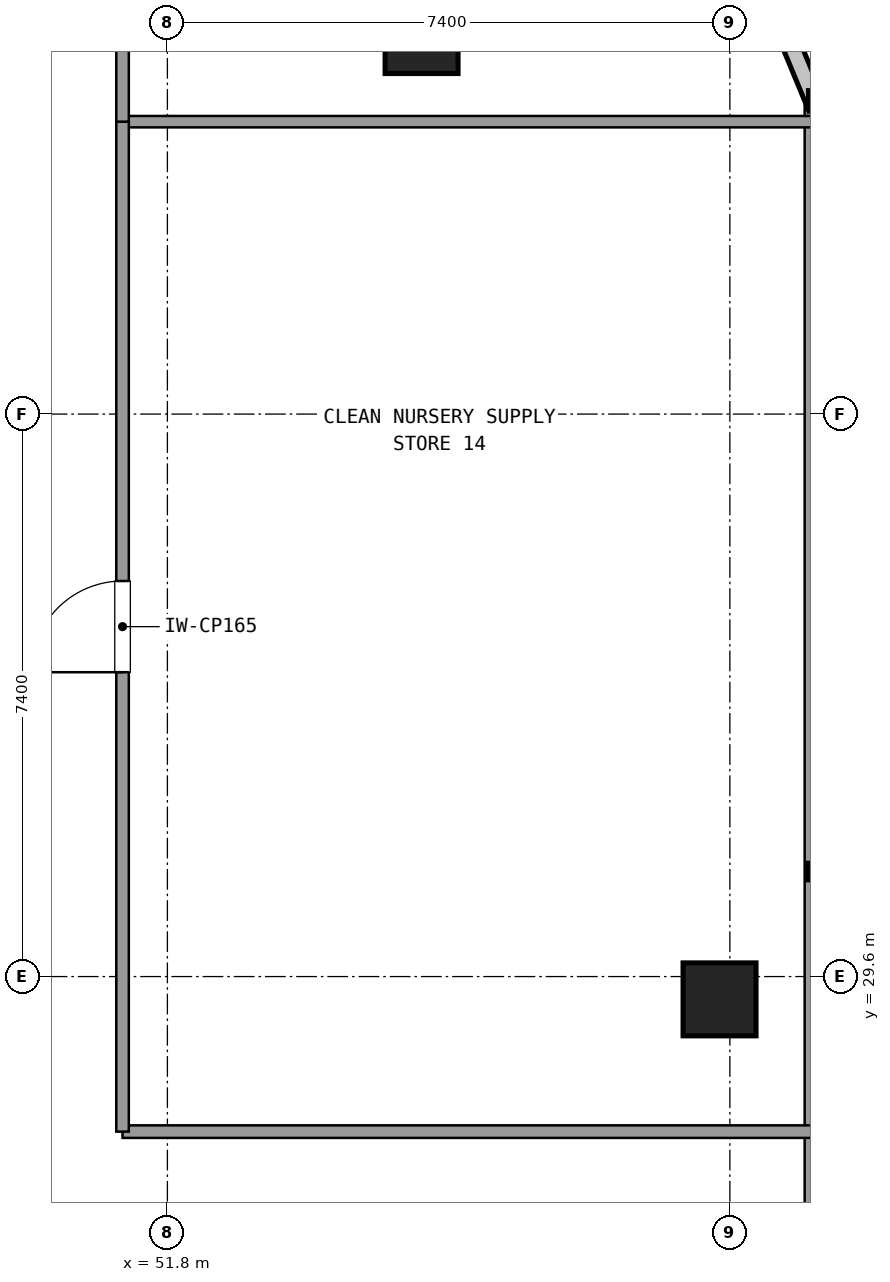
"""IFC4 building model, lengths in metres.
Left out: names, types, materials, properties, quantities, classifications, styles, units other than length and angle.
Written with IfcOpenShell. Run it as: python <this file> out.ifc"""

import sys

from ifc_helpers import new_model, si_unit, direction, frame, frame_2d, origin, origin_2d, place, context, subcontext, project, spatial, rectangle, extrude, element, fill, save


model = new_model("IFC4")
c1 = context("Model", 3, precision=1e-05, world=origin(), true_north=direction((0.0, 1.0)))
c2 = subcontext(c1, "Body", "Model", "MODEL_VIEW")
j1 = project(units=[si_unit("LENGTHUNIT", "METRE"), si_unit("PLANEANGLEUNIT", "RADIAN")], contexts=[c1])
p1 = place(None, origin())
s1 = spatial("IfcSite", under=j1, at=p1, CompositionType="ELEMENT")
p2 = place(p1, origin())
s2 = spatial("IfcBuilding", under=s1, at=p2, CompositionType="ELEMENT")
p3 = place(p2, frame((0.0, 0.0, 163.62)))
s3 = spatial("IfcBuildingStorey", under=s2, at=p3, CompositionType="ELEMENT", Elevation=163.62)
for number, where, z_axis, x_axis in (
    (1, (59.064, 29.3, 0.0), (0.0, 0.0, 1.0), (1.0, 0.0, 0.0)),
    (2, (55.144, 41.96, 0.0), (0.0, 0.0, 1.0), (1.0, 0.0, 0.0)),
):
    element("IfcColumn", number, at=place(p3, frame(where, z_axis=z_axis, x_axis=x_axis)), inside=s3, PredefinedType="COLUMN", context=c2, shape_type="SweptSolid", body=[
        extrude(rectangle(XDim=0.96, YDim=0.96, at=origin_2d()), origin(), (0.0, 0.0, 1.0), 3.6),
    ])
p4 = place(p3, frame((60.304, 10.655, 0.0), z_axis=(0.0, 0.0, 1.0), x_axis=(0.0, 1.0, 0.0)))
e3 = element("IfcWall", 3, at=p4, inside=s3, PredefinedType="SOLIDWALL", context=c2, shape_type="SweptSolid", body=[
    extrude(rectangle(XDim=30.49, YDim=0.24, at=frame_2d((15.245, 0.0))), origin(), (0.0, 0.0, 1.0), 0.85),
])
p5 = place(p3, frame((51.21, 27.56, 0.0), z_axis=(0.0, 0.0, 1.0), x_axis=(1.0, 0.0, 0.0)))
e4 = element("IfcWall", 4, at=p5, inside=s3, PredefinedType="PARTITIONING", context=c2, shape_type="SweptSolid", body=[
    extrude(rectangle(XDim=9.074, YDim=0.165, at=frame_2d((4.537, 0.0))), origin(), (0.0, 0.0, 1.0), 2.61),
])
p6 = place(p3, frame((51.21, 40.847, 0.0), z_axis=(0.0, 0.0, 1.0), x_axis=(1.0, 0.0, 0.0)))
e5 = element("IfcWall", 5, at=p6, inside=s3, PredefinedType="PARTITIONING", context=c2, shape_type="SweptSolid", body=[
    extrude(rectangle(XDim=9.074, YDim=0.15, at=frame_2d((4.537, 0.0))), origin(), (0.0, 0.0, 1.0), 2.61),
])
p7 = place(p3, frame((51.21, 27.56, 0.0), z_axis=(0.0, 0.0, 1.0), x_axis=(0.0, 1.0, 0.0)))
e6 = element("IfcWall", 6, at=p7, inside=s3, PredefinedType="PARTITIONING", context=c2, shape_type="SweptSolid", body=[
    extrude(rectangle(XDim=13.287, YDim=0.165, at=frame_2d((6.644, 0.0))), origin(), (0.0, 0.0, 1.0), 2.61),
])
p8 = place(p7, frame((6.044, 0.0, 0.0)))
e7 = element("IfcOpeningElement", 7, at=p8, cuts=e6, PredefinedType="OPENING", context=c2, shape_type="SweptSolid", body=[
    extrude(rectangle(XDim=1.2, YDim=2.15, at=frame_2d((0.6, 1.075))), frame((0.0, 0.093, 0.0), z_axis=(0.0, -1.0, 0.0), x_axis=(1.0, 0.0, 0.0)), (0.0, 0.0, 1.0), 0.185),
])
p9 = place(p3, frame((51.21, 40.847, 0.0), z_axis=(0.0, 0.0, 1.0), x_axis=(0.0, 1.0, 0.0)))
e8 = element("IfcWall", 8, at=p9, inside=s3, PredefinedType="PARTITIONING", context=c2, shape_type="SweptSolid", body=[
    extrude(rectangle(XDim=6.253, YDim=0.165, at=frame_2d((3.126, 0.0))), origin(), (0.0, 0.0, 1.0), 2.61),
])
p10 = place(p9, frame((2.526, 0.0, 0.0)))
e9 = element("IfcOpeningElement", 9, at=p10, cuts=e8, PredefinedType="OPENING", context=c2, shape_type="SweptSolid", body=[
    extrude(rectangle(XDim=1.2, YDim=2.15, at=frame_2d((0.6, 1.075))), frame((0.0, 0.093, 0.0), z_axis=(0.0, -1.0, 0.0), x_axis=(1.0, 0.0, 0.0)), (0.0, 0.0, 1.0), 0.185),
])
p11 = place(p8, origin())
e10 = element("IfcDoor", 10, at=p11, inside=s3, OperationType="SINGLE_SWING_LEFT", PredefinedType="DOOR", context=c2, shape_type="SweptSolid", body=[
    extrude(rectangle(XDim=1.2, YDim=2.15, at=frame_2d((0.6, 1.075))), frame((0.0, 0.025, 0.0), z_axis=(0.0, -1.0, 0.0), x_axis=(1.0, 0.0, 0.0)), (0.0, 0.0, 1.0), 0.05),
])
fill(e7, e10)
save(model, sys.argv[1])
